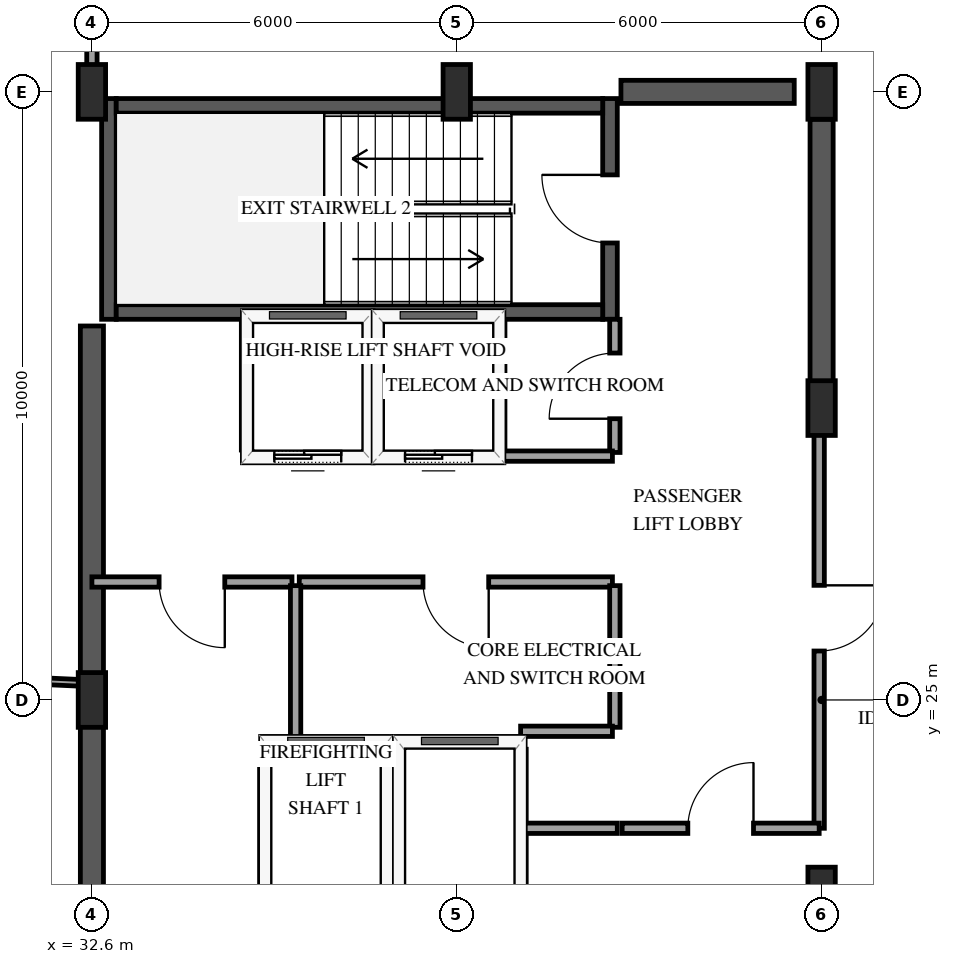
"""IFC4 building model, lengths in metres.
Left out: names, types, materials, properties, quantities, classifications, styles, units other than length and angle.
Written with IfcOpenShell. Run it as: python <this file> out.ifc"""

import sys

from ifc_helpers import new_model, si_unit, direction, frame, frame_2d, origin, origin_2d, place, context, subcontext, project, spatial, rectangle, extrude, element, fill, save


model = new_model("IFC4")
c1 = context("Model", 3, precision=1e-05, world=origin(), true_north=direction((0.0, 1.0)))
c2 = subcontext(c1, "Body", "Model", "MODEL_VIEW")
j1 = project(units=[si_unit("LENGTHUNIT", "METRE"), si_unit("PLANEANGLEUNIT", "RADIAN")], contexts=[c1])
p1 = place(None, origin())
s1 = spatial("IfcSite", under=j1, at=p1, CompositionType="ELEMENT")
p2 = place(p1, origin())
s2 = spatial("IfcBuilding", under=s1, at=p2, CompositionType="ELEMENT")
p3 = place(p2, frame((0.0, 0.0, 297.25)))
s3 = spatial("IfcBuildingStorey", under=s2, at=p3, CompositionType="ELEMENT", Elevation=297.25)
p4 = place(p3, frame((32.88, 31.26, 0.0), z_axis=(0.0, 0.0, 1.0), x_axis=(0.0, 1.0, 0.0)))
e1 = element("IfcWall", 1, at=p4, inside=s3, PredefinedType="SHEAR", context=c2, shape_type="SweptSolid", body=[
    extrude(rectangle(XDim=3.63, YDim=0.24, at=frame_2d((1.815, 0.0))), origin(), (0.0, 0.0, 1.0), 4.2),
])
p5 = place(p3, frame((41.12, 31.26, 0.0), z_axis=(0.0, 0.0, 1.0), x_axis=(0.0, 1.0, 0.0)))
e2 = element("IfcWall", 2, at=p5, inside=s3, PredefinedType="SHEAR", context=c2, shape_type="SweptSolid", body=[
    extrude(rectangle(XDim=3.63, YDim=0.24, at=frame_2d((1.815, 0.0))), origin(), (0.0, 0.0, 1.0), 4.2),
])
p6 = place(p5, frame((1.255, 0.0, 0.0)))
e3 = element("IfcOpeningElement", 3, at=p6, cuts=e2, PredefinedType="OPENING", context=c2, shape_type="SweptSolid", body=[
    extrude(rectangle(XDim=1.12, YDim=2.15, at=frame_2d((0.56, 1.075))), frame((0.0, 0.13, 0.0), z_axis=(0.0, -1.0, 0.0), x_axis=(1.0, 0.0, 0.0)), (0.0, 0.0, 1.0), 0.26),
])
for number, where, z_axis, x_axis in (
    (4, (33.0, 31.38, 0.0), (0.0, 0.0, 1.0), (1.0, 0.0, 0.0)),
    (5, (33.0, 34.77, 0.0), (0.0, 0.0, 1.0), (1.0, 0.0, 0.0)),
):
    element("IfcWall", number, at=place(p3, frame(where, z_axis=z_axis, x_axis=x_axis)), inside=s3, PredefinedType="SHEAR", context=c2, shape_type="SweptSolid", body=[
        extrude(rectangle(XDim=8.0, YDim=0.24, at=frame_2d((4.0, 0.0))), origin(), (0.0, 0.0, 1.0), 4.2),
    ])
p7 = place(p3, frame((32.6, 18.85, 0.0), z_axis=(0.0, 0.0, 1.0), x_axis=(0.0, 1.0, 0.0)))
e6 = element("IfcWall", 6, at=p7, inside=s3, PredefinedType="SHEAR", context=c2, shape_type="SweptSolid", body=[
    extrude(rectangle(XDim=12.3, YDim=0.38, at=frame_2d((6.15, 0.0))), origin(), (0.0, 0.0, 1.0), 4.2),
])
p8 = place(p3, frame((41.3, 35.0, 0.0), z_axis=(0.0, 0.0, 1.0), x_axis=(1.0, 0.0, 0.0)))
e7 = element("IfcWall", 7, at=p8, inside=s3, PredefinedType="SHEAR", context=c2, shape_type="SweptSolid", body=[
    extrude(rectangle(XDim=2.85, YDim=0.38, at=frame_2d((1.425, 0.0))), origin(), (0.0, 0.0, 1.0), 4.2),
])
p9 = place(p3, frame((44.6, 29.8, 0.0), z_axis=(0.0, 0.0, 1.0), x_axis=(0.0, 1.0, 0.0)))
e8 = element("IfcWall", 8, at=p9, inside=s3, PredefinedType="SHEAR", context=c2, shape_type="SweptSolid", body=[
    extrude(rectangle(XDim=4.75, YDim=0.38, at=frame_2d((2.375, 0.0))), origin(), (0.0, 0.0, 1.0), 4.2),
])
for number, where, z_axis, x_axis in (
    (9, (32.6, 25.0, 0.0), (0.0, 0.0, 1.0), (1.0, 0.0, 0.0)),
    (10, (32.6, 35.0, 0.0), (0.0, 0.0, 1.0), (1.0, 0.0, 0.0)),
    (11, (38.6, 35.0, 0.0), (0.0, 0.0, 1.0), (1.0, 0.0, 0.0)),
    (12, (44.6, 21.8, 0.0), (0.0, 0.0, 1.0), (1.0, 0.0, 0.0)),
    (13, (44.6, 29.8, 0.0), (0.0, 0.0, 1.0), (1.0, 0.0, 0.0)),
    (14, (44.6, 35.0, 0.0), (0.0, 0.0, 1.0), (1.0, 0.0, 0.0)),
):
    element("IfcColumn", number, at=place(p3, frame(where, z_axis=z_axis, x_axis=x_axis)), inside=s3, PredefinedType="PILASTER", context=c2, shape_type="SweptSolid", body=[
        extrude(rectangle(XDim=0.45, YDim=0.9, at=origin_2d()), origin(), (0.0, 0.0, 1.0), 4.2),
    ])
p10 = place(p3, frame((35.45, 24.3, 0.0), z_axis=(0.0, 0.0, 1.0), x_axis=(1.0, 0.0, 0.0)))
e15 = element("IfcWall", 15, at=p10, inside=s3, PredefinedType="SOLIDWALL", context=c2, shape_type="SweptSolid", body=[
    extrude(rectangle(XDim=2.0, YDim=0.185, at=frame_2d((1.0, 0.0))), origin(), (0.0, 0.0, 1.0), 3.895),
])
for number, where, z_axis, x_axis in (
    (16, (35.45, 21.81, 0.0), (0.0, 0.0, 1.0), (0.0, 1.0, 0.0)),
    (17, (37.45, 21.81, 0.0), (0.0, 0.0, 1.0), (0.0, 1.0, 0.0)),
):
    element("IfcWall", number, at=place(p3, frame(where, z_axis=z_axis, x_axis=x_axis)), inside=s3, PredefinedType="SOLIDWALL", context=c2, shape_type="SweptSolid", body=[
        extrude(rectangle(XDim=2.38, YDim=0.185, at=frame_2d((1.19, 0.0))), origin(), (0.0, 0.0, 1.0), 3.895),
    ])
p11 = place(p3, frame((37.65, 24.3, 0.0), z_axis=(0.0, 0.0, 1.0), x_axis=(1.0, 0.0, 0.0)))
e18 = element("IfcWall", 18, at=p11, inside=s3, PredefinedType="SOLIDWALL", context=c2, shape_type="SweptSolid", body=[
    extrude(rectangle(XDim=2.0, YDim=0.185, at=frame_2d((1.0, 0.0))), origin(), (0.0, 0.0, 1.0), 3.895),
])
p12 = place(p3, frame((39.65, 21.81, 0.0), z_axis=(0.0, 0.0, 1.0), x_axis=(0.0, 1.0, 0.0)))
e19 = element("IfcWall", 19, at=p12, inside=s3, PredefinedType="SOLIDWALL", context=c2, shape_type="SweptSolid", body=[
    extrude(rectangle(XDim=2.38, YDim=0.185, at=frame_2d((1.19, 0.0))), origin(), (0.0, 0.0, 1.0), 3.895),
])
p13 = place(p3, frame((35.15, 29.0, 0.0), z_axis=(0.0, 0.0, 1.0), x_axis=(1.0, 0.0, 0.0)))
e20 = element("IfcWall", 20, at=p13, inside=s3, PredefinedType="SOLIDWALL", context=c2, shape_type="SweptSolid", body=[
    extrude(rectangle(XDim=2.0, YDim=0.185, at=frame_2d((1.0, 0.0))), origin(), (0.0, 0.0, 1.0), 3.895),
])
p14 = place(p13, frame((0.45, 0.0, 0.0)))
e21 = element("IfcOpeningElement", 21, at=p14, cuts=e20, PredefinedType="OPENING", context=c2, shape_type="SweptSolid", body=[
    extrude(rectangle(XDim=1.1, YDim=2.15, at=frame_2d((0.55, 1.075))), frame((0.0, 0.103, 0.0), z_axis=(0.0, -1.0, 0.0), x_axis=(1.0, 0.0, 0.0)), (0.0, 0.0, 1.0), 0.205),
])
for number, where, z_axis, x_axis in (
    (22, (35.15, 29.11, 0.0), (0.0, 0.0, 1.0), (0.0, 1.0, 0.0)),
    (23, (37.15, 29.11, 0.0), (0.0, 0.0, 1.0), (0.0, 1.0, 0.0)),
):
    element("IfcWall", number, at=place(p3, frame(where, z_axis=z_axis, x_axis=x_axis)), inside=s3, PredefinedType="SOLIDWALL", context=c2, shape_type="SweptSolid", body=[
        extrude(rectangle(XDim=2.1, YDim=0.185, at=frame_2d((1.05, 0.0))), origin(), (0.0, 0.0, 1.0), 3.895),
    ])
p15 = place(p3, frame((37.3, 29.0, 0.0), z_axis=(0.0, 0.0, 1.0), x_axis=(1.0, 0.0, 0.0)))
e24 = element("IfcWall", 24, at=p15, inside=s3, PredefinedType="SOLIDWALL", context=c2, shape_type="SweptSolid", body=[
    extrude(rectangle(XDim=2.0, YDim=0.185, at=frame_2d((1.0, 0.0))), origin(), (0.0, 0.0, 1.0), 3.895),
])
p16 = place(p15, frame((0.45, 0.0, 0.0)))
e25 = element("IfcOpeningElement", 25, at=p16, cuts=e24, PredefinedType="OPENING", context=c2, shape_type="SweptSolid", body=[
    extrude(rectangle(XDim=1.1, YDim=2.15, at=frame_2d((0.55, 1.075))), frame((0.0, 0.103, 0.0), z_axis=(0.0, -1.0, 0.0), x_axis=(1.0, 0.0, 0.0)), (0.0, 0.0, 1.0), 0.205),
])
p17 = place(p3, frame((39.3, 29.11, 0.0), z_axis=(0.0, 0.0, 1.0), x_axis=(0.0, 1.0, 0.0)))
e26 = element("IfcWall", 26, at=p17, inside=s3, PredefinedType="SOLIDWALL", context=c2, shape_type="SweptSolid", body=[
    extrude(rectangle(XDim=2.1, YDim=0.185, at=frame_2d((1.05, 0.0))), origin(), (0.0, 0.0, 1.0), 3.895),
])
p18 = place(p3, frame((32.527, 25.276, 0.0), z_axis=(0.0, 0.0, 1.0), x_axis=(-0.998965188352, 0.045481341909, 0.0)))
e27 = element("IfcWall", 27, at=p18, inside=s3, PredefinedType="PARTITIONING", context=c2, shape_type="SweptSolid", body=[
    extrude(rectangle(XDim=7.215, YDim=0.11, at=frame_2d((3.607, 0.0))), origin(), (0.0, 0.0, 1.0), 3.19),
])
p19 = place(p3, frame((44.56, 29.8, 0.0), z_axis=(0.0, 0.0, 1.0), x_axis=(0.0, -1.0, 0.0)))
e28 = element("IfcWall", 28, at=p19, inside=s3, PredefinedType="PARTITIONING", context=c2, shape_type="SweptSolid", body=[
    extrude(rectangle(XDim=6.91, YDim=0.17, at=frame_2d((3.455, 0.0))), origin(), (0.0, 0.0, 1.0), 2.935),
])
p20 = place(p19, frame((2.915, 0.0, 0.0)))
e29 = element("IfcOpeningElement", 29, at=p20, cuts=e28, PredefinedType="OPENING", context=c2, shape_type="SweptSolid", body=[
    extrude(rectangle(XDim=1.08, YDim=2.15, at=frame_2d((0.54, 1.075))), frame((0.0, 0.095, 0.0), z_axis=(0.0, -1.0, 0.0), x_axis=(1.0, 0.0, 0.0)), (0.0, 0.0, 1.0), 0.19),
])
p21 = place(p3, frame((41.16, 26.94, 0.0), z_axis=(0.0, 0.0, 1.0), x_axis=(-1.0, 0.0, 0.0)))
e30 = element("IfcWall", 30, at=p21, inside=s3, PredefinedType="PARTITIONING", context=c2, shape_type="SweptSolid", body=[
    extrude(rectangle(XDim=5.15, YDim=0.17, at=frame_2d((2.575, 0.0))), origin(), (0.0, 0.0, 1.0), 3.895),
])
p22 = place(p21, frame((2.035, 0.0, 0.0)))
e31 = element("IfcOpeningElement", 31, at=p22, cuts=e30, PredefinedType="OPENING", context=c2, shape_type="SweptSolid", body=[
    extrude(rectangle(XDim=1.08, YDim=2.15, at=frame_2d((0.54, 1.075))), frame((0.0, 0.095, 0.0), z_axis=(0.0, -1.0, 0.0), x_axis=(1.0, 0.0, 0.0)), (0.0, 0.0, 1.0), 0.19),
])
p23 = place(p3, frame((35.89, 26.94, 0.0), z_axis=(0.0, 0.0, 1.0), x_axis=(-1.0, 0.0, 0.0)))
e32 = element("IfcWall", 32, at=p23, inside=s3, PredefinedType="PARTITIONING", context=c2, shape_type="SweptSolid", body=[
    extrude(rectangle(XDim=3.29, YDim=0.17, at=frame_2d((1.645, 0.0))), origin(), (0.0, 0.0, 1.0), 3.895),
])
p24 = place(p23, frame((1.105, 0.0, 0.0)))
e33 = element("IfcOpeningElement", 33, at=p24, cuts=e32, PredefinedType="OPENING", context=c2, shape_type="SweptSolid", body=[
    extrude(rectangle(XDim=1.08, YDim=2.15, at=frame_2d((0.54, 1.075))), frame((0.0, 0.095, 0.0), z_axis=(0.0, -1.0, 0.0), x_axis=(1.0, 0.0, 0.0)), (0.0, 0.0, 1.0), 0.19),
])
p25 = place(p3, frame((41.32, 22.89, 0.0), z_axis=(0.0, 0.0, 1.0), x_axis=(1.0, 0.0, 0.0)))
e34 = element("IfcWall", 34, at=p25, inside=s3, PredefinedType="PARTITIONING", context=c2, shape_type="SweptSolid", body=[
    extrude(rectangle(XDim=3.24, YDim=0.17, at=frame_2d((1.62, 0.0))), origin(), (0.0, 0.0, 1.0), 3.895),
])
p26 = place(p25, frame((1.08, 0.0, 0.0)))
e35 = element("IfcOpeningElement", 35, at=p26, cuts=e34, PredefinedType="OPENING", context=c2, shape_type="SweptSolid", body=[
    extrude(rectangle(XDim=1.08, YDim=2.15, at=frame_2d((0.54, 1.075))), frame((0.0, 0.095, 0.0), z_axis=(0.0, -1.0, 0.0), x_axis=(1.0, 0.0, 0.0)), (0.0, 0.0, 1.0), 0.19),
])
p27 = place(p3, frame((35.95, 26.88, 0.0), z_axis=(0.0, 0.0, 1.0), x_axis=(0.0, -1.0, 0.0)))
e36 = element("IfcWall", 36, at=p27, inside=s3, PredefinedType="PARTITIONING", context=c2, shape_type="SweptSolid", body=[
    extrude(rectangle(XDim=2.58, YDim=0.17, at=frame_2d((1.29, 0.0))), origin(), (0.0, 0.0, 1.0), 3.895),
])
p28 = place(p3, frame((41.2, 24.55, 0.0), z_axis=(0.0, 0.0, 1.0), x_axis=(0.0, 1.0, 0.0)))
e37 = element("IfcWall", 37, at=p28, inside=s3, PredefinedType="PARTITIONING", context=c2, shape_type="SweptSolid", body=[
    extrude(rectangle(XDim=2.33, YDim=0.17, at=frame_2d((1.165, 0.0))), origin(), (0.0, 0.0, 1.0), 3.895),
])
p29 = place(p3, frame((41.2, 29.07, 0.0), z_axis=(0.0, 0.0, 1.0), x_axis=(0.0, 1.0, 0.0)))
e38 = element("IfcWall", 38, at=p29, inside=s3, PredefinedType="PARTITIONING", context=c2, shape_type="SweptSolid", body=[
    extrude(rectangle(XDim=2.19, YDim=0.17, at=frame_2d((1.095, 0.0))), origin(), (0.0, 0.0, 1.0), 3.895),
])
p30 = place(p29, frame((0.555, 0.0, 0.0)))
e39 = element("IfcOpeningElement", 39, at=p30, cuts=e38, PredefinedType="OPENING", context=c2, shape_type="SweptSolid", body=[
    extrude(rectangle(XDim=1.08, YDim=2.15, at=frame_2d((0.54, 1.075))), frame((0.0, 0.095, 0.0), z_axis=(0.0, -1.0, 0.0), x_axis=(1.0, 0.0, 0.0)), (0.0, 0.0, 1.0), 0.19),
])
p31 = place(p3, frame((39.3, 29.01, 0.0), z_axis=(0.0, 0.0, 1.0), x_axis=(1.0, 0.0, 0.0)))
e40 = element("IfcWall", 40, at=p31, inside=s3, PredefinedType="PARTITIONING", context=c2, shape_type="SweptSolid", body=[
    extrude(rectangle(XDim=1.86, YDim=0.17, at=frame_2d((0.93, 0.0))), origin(), (0.0, 0.0, 1.0), 3.895),
])
p32 = place(p3, frame((39.72, 22.89, 0.0), z_axis=(0.0, 0.0, 1.0), x_axis=(1.0, 0.0, 0.0)))
e41 = element("IfcWall", 41, at=p32, inside=s3, PredefinedType="PARTITIONING", context=c2, shape_type="SweptSolid", body=[
    extrude(rectangle(XDim=1.52, YDim=0.17, at=frame_2d((0.76, 0.0))), origin(), (0.0, 0.0, 1.0), 3.895),
])
p33 = place(p3, frame((32.6, 35.12, 0.0), z_axis=(0.0, 0.0, 1.0), x_axis=(0.0, 1.0, 0.0)))
e42 = element("IfcWall", 42, at=p33, inside=s3, PredefinedType="PARTITIONING", context=c2, shape_type="SweptSolid", body=[
    extrude(rectangle(XDim=1.51, YDim=0.17, at=frame_2d((0.755, 0.0))), origin(), (0.0, 0.0, 1.0), 3.895),
])
p34 = place(p3, frame((39.65, 24.485, 0.0), z_axis=(0.0, 0.0, 1.0), x_axis=(1.0, 0.0, 0.0)))
e43 = element("IfcWall", 43, at=p34, inside=s3, PredefinedType="PARTITIONING", context=c2, shape_type="SweptSolid", body=[
    extrude(rectangle(XDim=1.51, YDim=0.17, at=frame_2d((0.755, 0.0))), origin(), (0.0, 0.0, 1.0), 3.895),
])
p35 = place(p14, origin())
e44 = element("IfcDoor", 44, at=p35, inside=s3, OperationType="SLIDING_TO_LEFT", PredefinedType="DOOR", context=c2, shape_type="SweptSolid", body=[
    extrude(rectangle(XDim=1.1, YDim=2.15, at=frame_2d((0.55, 1.075))), frame((0.0, 0.025, 0.0), z_axis=(0.0, -1.0, 0.0), x_axis=(1.0, 0.0, 0.0)), (0.0, 0.0, 1.0), 0.05),
])
fill(e21, e44)
p36 = place(p16, origin())
e45 = element("IfcDoor", 45, at=p36, inside=s3, OperationType="SLIDING_TO_LEFT", PredefinedType="DOOR", context=c2, shape_type="SweptSolid", body=[
    extrude(rectangle(XDim=1.1, YDim=2.15, at=frame_2d((0.55, 1.075))), frame((0.0, 0.025, 0.0), z_axis=(0.0, -1.0, 0.0), x_axis=(1.0, 0.0, 0.0)), (0.0, 0.0, 1.0), 0.05),
])
fill(e25, e45)
p37 = place(p6, origin())
e46 = element("IfcDoor", 46, at=p37, inside=s3, OperationType="SINGLE_SWING_RIGHT", PredefinedType="DOOR", context=c2, shape_type="SweptSolid", body=[
    extrude(rectangle(XDim=1.12, YDim=2.15, at=frame_2d((0.56, 1.075))), frame((0.0, 0.025, 0.0), z_axis=(0.0, -1.0, 0.0), x_axis=(1.0, 0.0, 0.0)), (0.0, 0.0, 1.0), 0.05),
])
fill(e3, e46)
p38 = place(p20, origin())
e47 = element("IfcDoor", 47, at=p38, inside=s3, OperationType="SINGLE_SWING_LEFT", PredefinedType="DOOR", context=c2, shape_type="SweptSolid", body=[
    extrude(rectangle(XDim=1.08, YDim=2.15, at=frame_2d((0.54, 1.075))), frame((0.0, 0.025, 0.0), z_axis=(0.0, -1.0, 0.0), x_axis=(1.0, 0.0, 0.0)), (0.0, 0.0, 1.0), 0.05),
])
fill(e29, e47)
p39 = place(p22, origin())
e48 = element("IfcDoor", 48, at=p39, inside=s3, OperationType="SINGLE_SWING_LEFT", PredefinedType="DOOR", context=c2, shape_type="SweptSolid", body=[
    extrude(rectangle(XDim=1.08, YDim=2.15, at=frame_2d((0.54, 1.075))), frame((0.0, 0.025, 0.0), z_axis=(0.0, -1.0, 0.0), x_axis=(1.0, 0.0, 0.0)), (0.0, 0.0, 1.0), 0.05),
])
fill(e31, e48)
p40 = place(p24, origin())
e49 = element("IfcDoor", 49, at=p40, inside=s3, OperationType="SINGLE_SWING_LEFT", PredefinedType="DOOR", context=c2, shape_type="SweptSolid", body=[
    extrude(rectangle(XDim=1.08, YDim=2.15, at=frame_2d((0.54, 1.075))), frame((0.0, 0.025, 0.0), z_axis=(0.0, -1.0, 0.0), x_axis=(1.0, 0.0, 0.0)), (0.0, 0.0, 1.0), 0.05),
])
fill(e33, e49)
p41 = place(p26, origin())
e50 = element("IfcDoor", 50, at=p41, inside=s3, OperationType="SINGLE_SWING_RIGHT", PredefinedType="DOOR", context=c2, shape_type="SweptSolid", body=[
    extrude(rectangle(XDim=1.08, YDim=2.15, at=frame_2d((0.54, 1.075))), frame((0.0, 0.025, 0.0), z_axis=(0.0, -1.0, 0.0), x_axis=(1.0, 0.0, 0.0)), (0.0, 0.0, 1.0), 0.05),
])
fill(e35, e50)
p42 = place(p30, origin())
e51 = element("IfcDoor", 51, at=p42, inside=s3, OperationType="SINGLE_SWING_LEFT", PredefinedType="DOOR", context=c2, shape_type="SweptSolid", body=[
    extrude(rectangle(XDim=1.08, YDim=2.15, at=frame_2d((0.54, 1.075))), frame((0.0, 0.025, 0.0), z_axis=(0.0, -1.0, 0.0), x_axis=(1.0, 0.0, 0.0)), (0.0, 0.0, 1.0), 0.05),
])
fill(e39, e51)
save(model, sys.argv[1])
